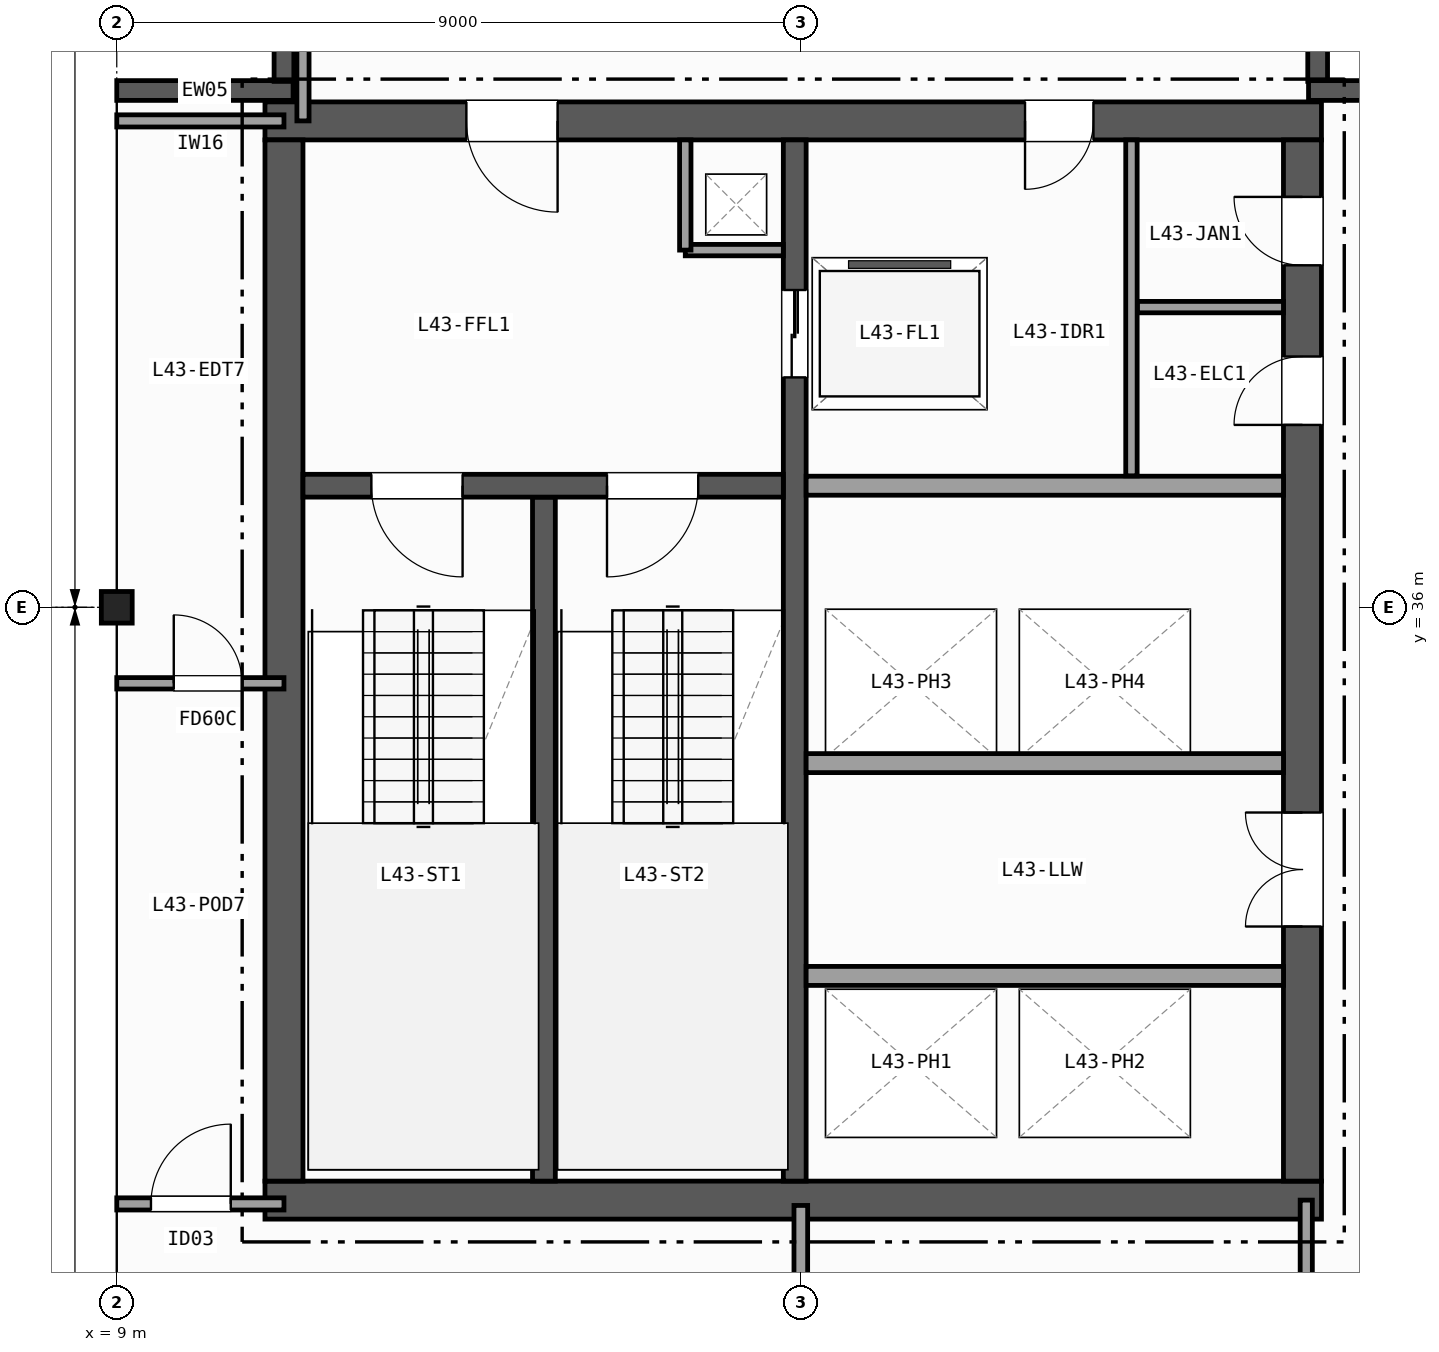
"""IFC4 building model, lengths in metres.
Left out: names, types, materials, properties, quantities, classifications, styles, units other than length and angle.
Written with IfcOpenShell. Run it as: python <this file> out.ifc"""

import sys

from ifc_helpers import new_model, si_unit, direction, frame, frame_2d, origin, origin_2d, place, context, subcontext, project, spatial, rectangle, i_section, extrude, element, fill, save


model = new_model("IFC4")
c1 = context("Model", 3, precision=1e-05, world=origin(), true_north=direction((0.0, 1.0)))
c2 = subcontext(c1, "Body", "Model", "MODEL_VIEW")
j1 = project(units=[si_unit("LENGTHUNIT", "METRE"), si_unit("PLANEANGLEUNIT", "RADIAN")], contexts=[c1])
p1 = place(None, origin())
s1 = spatial("IfcSite", under=j1, at=p1, CompositionType="ELEMENT")
p2 = place(p1, origin())
s2 = spatial("IfcBuilding", under=s1, at=p2, CompositionType="ELEMENT")
p3 = place(p2, frame((0.0, 0.0, 174.2)))
s3 = spatial("IfcBuildingStorey", under=s2, at=p3, CompositionType="ELEMENT", Elevation=174.2)
p4 = place(p3, frame((9.0, 36.0, 0.0), z_axis=(0.0, 0.0, 1.0), x_axis=(1.0, 0.0, 0.0)))
e1 = element("IfcColumn", 1, at=p4, inside=s3, PredefinedType="COLUMN", context=c2, shape_type="SweptSolid", body=[
    extrude(i_section(OverallWidth=0.406, OverallDepth=0.416, WebThickness=0.03, FlangeThickness=0.048, FilletRadius=0.015, at=origin_2d()), origin(), (0.0, 0.0, 1.0), 3.7),
])
p5 = place(p3, frame((9.0, 42.8, 0.0), z_axis=(0.0, 0.0, 1.0), x_axis=(1.0, 0.0, 0.0)))
e2 = element("IfcWall", 2, at=p5, inside=s3, PredefinedType="SOLIDWALL", context=c2, shape_type="SweptSolid", body=[
    extrude(rectangle(XDim=2.32, YDim=0.26, at=frame_2d((1.16, 0.0))), origin(), (0.0, 0.0, 1.0), 3.42),
])
for number, where, z_axis, x_axis in (
    (3, (11.2, 42.92, 0.0), (0.0, 0.0, 1.0), (0.0, 1.0, 0.0)),
    (4, (24.8, 45.0, 0.0), (0.0, 0.0, 1.0), (0.0, -1.0, 0.0)),
):
    element("IfcWall", number, at=place(p3, frame(where, z_axis=z_axis, x_axis=x_axis)), inside=s3, PredefinedType="SOLIDWALL", context=c2, shape_type="SweptSolid", body=[
        extrude(rectangle(XDim=2.08, YDim=0.26, at=frame_2d((1.04, 0.0))), origin(), (0.0, 0.0, 1.0), 3.42),
    ])
p6 = place(p3, frame((24.68, 42.8, 0.0), z_axis=(0.0, 0.0, 1.0), x_axis=(1.0, 0.0, 0.0)))
e5 = element("IfcWall", 5, at=p6, inside=s3, PredefinedType="SOLIDWALL", context=c2, shape_type="SweptSolid", body=[
    extrude(rectangle(XDim=2.32, YDim=0.26, at=frame_2d((1.16, 0.0))), origin(), (0.0, 0.0, 1.0), 3.42),
])
p7 = place(p3, frame((10.95, 28.2, 0.0), z_axis=(0.0, 0.0, 1.0), x_axis=(1.0, 0.0, 0.0)))
e6 = element("IfcWall", 6, at=p7, inside=s3, PredefinedType="SHEAR", context=c2, shape_type="SweptSolid", body=[
    extrude(rectangle(XDim=13.9, YDim=0.5, at=frame_2d((6.95, 0.0))), origin(), (0.0, 0.0, 1.0), 3.42),
])
p8 = place(p3, frame((24.85, 42.4, 0.0), z_axis=(0.0, 0.0, 1.0), x_axis=(-1.0, 0.0, 0.0)))
e7 = element("IfcWall", 7, at=p8, inside=s3, PredefinedType="SHEAR", context=c2, shape_type="SweptSolid", body=[
    extrude(rectangle(XDim=13.9, YDim=0.5, at=frame_2d((6.95, 0.0))), origin(), (0.0, 0.0, 1.0), 3.42),
])
p9 = place(p8, frame((10.05, 0.0, 0.0)))
e8 = element("IfcOpeningElement", 8, at=p9, cuts=e7, PredefinedType="OPENING", context=c2, shape_type="SweptSolid", body=[
    extrude(rectangle(XDim=1.2, YDim=2.15, at=frame_2d((0.6, 1.075))), frame((0.0, 0.26, 0.0), z_axis=(0.0, -1.0, 0.0), x_axis=(1.0, 0.0, 0.0)), (0.0, 0.0, 1.0), 0.52),
])
p10 = place(p8, frame((3.0, 0.0, 0.0)))
e9 = element("IfcOpeningElement", 9, at=p10, cuts=e7, PredefinedType="OPENING", context=c2, shape_type="SweptSolid", body=[
    extrude(rectangle(XDim=0.9, YDim=2.1, at=frame_2d((0.45, 1.05))), frame((0.0, 0.26, 0.0), z_axis=(0.0, -1.0, 0.0), x_axis=(1.0, 0.0, 0.0)), (0.0, 0.0, 1.0), 0.52),
])
p11 = place(p3, frame((11.2, 42.15, 0.0), z_axis=(0.0, 0.0, 1.0), x_axis=(0.0, -1.0, 0.0)))
e10 = element("IfcWall", 10, at=p11, inside=s3, PredefinedType="SHEAR", context=c2, shape_type="SweptSolid", body=[
    extrude(rectangle(XDim=13.7, YDim=0.5, at=frame_2d((6.85, 0.0))), origin(), (0.0, 0.0, 1.0), 3.42),
])
p12 = place(p3, frame((24.6, 28.45, 0.0), z_axis=(0.0, 0.0, 1.0), x_axis=(0.0, 1.0, 0.0)))
e11 = element("IfcWall", 11, at=p12, inside=s3, PredefinedType="SHEAR", context=c2, shape_type="SweptSolid", body=[
    extrude(rectangle(XDim=13.7, YDim=0.5, at=frame_2d((6.85, 0.0))), origin(), (0.0, 0.0, 1.0), 3.42),
])
p13 = place(p12, frame((3.35, 0.0, 0.0)))
e12 = element("IfcOpeningElement", 12, at=p13, cuts=e11, PredefinedType="OPENING", context=c2, shape_type="SweptSolid", body=[
    extrude(rectangle(XDim=1.5, YDim=2.2, at=frame_2d((0.75, 1.1))), frame((0.0, 0.26, 0.0), z_axis=(0.0, -1.0, 0.0), x_axis=(1.0, 0.0, 0.0)), (0.0, 0.0, 1.0), 0.52),
])
p14 = place(p12, frame((9.95, 0.0, 0.0)))
e13 = element("IfcOpeningElement", 13, at=p14, cuts=e11, PredefinedType="OPENING", context=c2, shape_type="SweptSolid", body=[
    extrude(rectangle(XDim=0.9, YDim=2.1, at=frame_2d((0.45, 1.05))), frame((0.0, 0.26, 0.0), z_axis=(0.0, -1.0, 0.0), x_axis=(1.0, 0.0, 0.0)), (0.0, 0.0, 1.0), 0.52),
])
p15 = place(p12, frame((12.05, 0.0, 0.0)))
e14 = element("IfcOpeningElement", 14, at=p15, cuts=e11, PredefinedType="OPENING", context=c2, shape_type="SweptSolid", body=[
    extrude(rectangle(XDim=0.9, YDim=2.1, at=frame_2d((0.45, 1.05))), frame((0.0, 0.26, 0.0), z_axis=(0.0, -1.0, 0.0), x_axis=(1.0, 0.0, 0.0)), (0.0, 0.0, 1.0), 0.52),
])
p16 = place(p3, frame((14.62, 28.45, 0.0), z_axis=(0.0, 0.0, 1.0), x_axis=(0.0, 1.0, 0.0)))
e15 = element("IfcWall", 15, at=p16, inside=s3, PredefinedType="SHEAR", context=c2, shape_type="SweptSolid", body=[
    extrude(rectangle(XDim=9.0, YDim=0.3, at=frame_2d((4.5, 0.0))), origin(), (0.0, 0.0, 1.0), 3.42),
])
p17 = place(p3, frame((17.92, 42.15, 0.0), z_axis=(0.0, 0.0, 1.0), x_axis=(0.0, -1.0, 0.0)))
e16 = element("IfcWall", 16, at=p17, inside=s3, PredefinedType="SHEAR", context=c2, shape_type="SweptSolid", body=[
    extrude(rectangle(XDim=13.7, YDim=0.3, at=frame_2d((6.85, 0.0))), origin(), (0.0, 0.0, 1.0), 3.42),
])
p18 = place(p17, frame((1.975, 0.0, 0.0)))
e17 = element("IfcOpeningElement", 17, at=p18, cuts=e16, PredefinedType="OPENING", context=c2, shape_type="SweptSolid", body=[
    extrude(rectangle(XDim=1.15, YDim=2.15, at=frame_2d((0.575, 1.075))), frame((0.0, 0.16, 0.0), z_axis=(0.0, -1.0, 0.0), x_axis=(1.0, 0.0, 0.0)), (0.0, 0.0, 1.0), 0.32),
])
p19 = place(p3, frame((17.77, 37.6, 0.0), z_axis=(0.0, 0.0, 1.0), x_axis=(-1.0, 0.0, 0.0)))
e18 = element("IfcWall", 18, at=p19, inside=s3, PredefinedType="SHEAR", context=c2, shape_type="SweptSolid", body=[
    extrude(rectangle(XDim=6.32, YDim=0.3, at=frame_2d((3.16, 0.0))), origin(), (0.0, 0.0, 1.0), 3.42),
])
p20 = place(p19, frame((4.22, 0.0, 0.0)))
e19 = element("IfcOpeningElement", 19, at=p20, cuts=e18, PredefinedType="OPENING", context=c2, shape_type="SweptSolid", body=[
    extrude(rectangle(XDim=1.2, YDim=2.15, at=frame_2d((0.6, 1.075))), frame((0.0, 0.16, 0.0), z_axis=(0.0, -1.0, 0.0), x_axis=(1.0, 0.0, 0.0)), (0.0, 0.0, 1.0), 0.32),
])
p21 = place(p19, frame((1.12, 0.0, 0.0)))
e20 = element("IfcOpeningElement", 20, at=p21, cuts=e18, PredefinedType="OPENING", context=c2, shape_type="SweptSolid", body=[
    extrude(rectangle(XDim=1.2, YDim=2.15, at=frame_2d((0.6, 1.075))), frame((0.0, 0.16, 0.0), z_axis=(0.0, -1.0, 0.0), x_axis=(1.0, 0.0, 0.0)), (0.0, 0.0, 1.0), 0.32),
])
p22 = place(p3, frame((16.48, 40.7, 0.0), z_axis=(0.0, 0.0, 1.0), x_axis=(1.0, 0.0, 0.0)))
e21 = element("IfcWall", 21, at=p22, inside=s3, PredefinedType="PARTITIONING", context=c2, shape_type="SweptSolid", body=[
    extrude(rectangle(XDim=1.29, YDim=0.15, at=frame_2d((0.645, 0.0))), origin(), (0.0, 0.0, 1.0), 3.42),
])
p23 = place(p3, frame((16.48, 40.7, 0.0), z_axis=(0.0, 0.0, 1.0), x_axis=(0.0, 1.0, 0.0)))
e22 = element("IfcWall", 22, at=p23, inside=s3, PredefinedType="PARTITIONING", context=c2, shape_type="SweptSolid", body=[
    extrude(rectangle(XDim=1.45, YDim=0.15, at=frame_2d((0.725, 0.0))), origin(), (0.0, 0.0, 1.0), 3.42),
])
for number, where, z_axis, x_axis in (
    (23, (18.07, 37.6, 0.0), (0.0, 0.0, 1.0), (1.0, 0.0, 0.0)),
    (24, (18.07, 31.15, 0.0), (0.0, 0.0, 1.0), (1.0, 0.0, 0.0)),
    (25, (24.35, 33.95, 0.0), (0.0, 0.0, 1.0), (-1.0, 0.0, 0.0)),
):
    element("IfcWall", number, at=place(p3, frame(where, z_axis=z_axis, x_axis=x_axis)), inside=s3, PredefinedType="PARTITIONING", context=c2, shape_type="SweptSolid", body=[
        extrude(rectangle(XDim=6.28, YDim=0.25, at=frame_2d((3.14, 0.0))), origin(), (0.0, 0.0, 1.0), 3.42),
    ])
p24 = place(p3, frame((22.35, 37.73, 0.0), z_axis=(0.0, 0.0, 1.0), x_axis=(0.0, 1.0, 0.0)))
e26 = element("IfcWall", 26, at=p24, inside=s3, PredefinedType="PARTITIONING", context=c2, shape_type="SweptSolid", body=[
    extrude(rectangle(XDim=4.42, YDim=0.15, at=frame_2d((2.21, 0.0))), origin(), (0.0, 0.0, 1.0), 3.42),
])
p25 = place(p3, frame((22.43, 39.95, 0.0), z_axis=(0.0, 0.0, 1.0), x_axis=(1.0, 0.0, 0.0)))
e27 = element("IfcWall", 27, at=p25, inside=s3, PredefinedType="PARTITIONING", context=c2, shape_type="SweptSolid", body=[
    extrude(rectangle(XDim=1.92, YDim=0.15, at=frame_2d((0.96, 0.0))), origin(), (0.0, 0.0, 1.0), 3.42),
])
p26 = place(p3, frame((9.0, 28.15, 0.0), z_axis=(0.0, 0.0, 1.0), x_axis=(1.0, 0.0, 0.0)))
e28 = element("IfcWall", 28, at=p26, inside=s3, PredefinedType="PARTITIONING", context=c2, shape_type="SweptSolid", body=[
    extrude(rectangle(XDim=2.2, YDim=0.16, at=frame_2d((1.1, 0.0))), origin(), (0.0, 0.0, 1.0), 2.634),
])
p27 = place(p26, frame((0.45, 0.0, 0.0)))
e29 = element("IfcOpeningElement", 29, at=p27, cuts=e28, PredefinedType="OPENING", context=c2, shape_type="SweptSolid", body=[
    extrude(rectangle(XDim=1.05, YDim=2.15, at=frame_2d((0.525, 1.075))), frame((0.0, 0.09, 0.0), z_axis=(0.0, -1.0, 0.0), x_axis=(1.0, 0.0, 0.0)), (0.0, 0.0, 1.0), 0.18),
])
p28 = place(p3, frame((9.0, 42.4, 0.0), z_axis=(0.0, 0.0, 1.0), x_axis=(1.0, 0.0, 0.0)))
e30 = element("IfcWall", 30, at=p28, inside=s3, PredefinedType="PARTITIONING", context=c2, shape_type="SweptSolid", body=[
    extrude(rectangle(XDim=2.2, YDim=0.16, at=frame_2d((1.1, 0.0))), origin(), (0.0, 0.0, 1.0), 3.42),
])
p29 = place(p3, frame((11.45, 42.4, 0.0), z_axis=(0.0, 0.0, 1.0), x_axis=(0.0, 1.0, 0.0)))
e31 = element("IfcWall", 31, at=p29, inside=s3, PredefinedType="PARTITIONING", context=c2, shape_type="SweptSolid", body=[
    extrude(rectangle(XDim=2.666, YDim=0.16, at=frame_2d((1.333, 0.0))), origin(), (0.0, 0.0, 1.0), 3.42),
])
p30 = place(p3, frame((9.0, 35.0, 0.0), z_axis=(0.0, 0.0, 1.0), x_axis=(1.0, 0.0, 0.0)))
e32 = element("IfcWall", 32, at=p30, inside=s3, PredefinedType="PARTITIONING", context=c2, shape_type="SweptSolid", body=[
    extrude(rectangle(XDim=2.2, YDim=0.15, at=frame_2d((1.1, 0.0))), origin(), (0.0, 0.0, 1.0), 2.634),
])
p31 = place(p30, frame((0.75, 0.0, 0.0)))
e33 = element("IfcOpeningElement", 33, at=p31, cuts=e32, PredefinedType="OPENING", context=c2, shape_type="SweptSolid", body=[
    extrude(rectangle(XDim=0.9, YDim=2.1, at=frame_2d((0.45, 1.05))), frame((0.0, 0.085, 0.0), z_axis=(0.0, -1.0, 0.0), x_axis=(1.0, 0.0, 0.0)), (0.0, 0.0, 1.0), 0.17),
])
p32 = place(p3, frame((24.65, 9.0, 0.0), z_axis=(0.0, 0.0, 1.0), x_axis=(0.0, 1.0, 0.0)))
e34 = element("IfcWall", 34, at=p32, inside=s3, PredefinedType="PARTITIONING", context=c2, shape_type="SweptSolid", body=[
    extrude(rectangle(XDim=19.2, YDim=0.16, at=frame_2d((9.6, 0.0))), origin(), (0.0, 0.0, 1.0), 2.634),
])
p33 = place(p32, frame((2.4, 0.0, 0.0)))
e35 = element("IfcOpeningElement", 35, at=p33, cuts=e34, PredefinedType="OPENING", context=c2, shape_type="SweptSolid", body=[
    extrude(rectangle(XDim=0.86, YDim=2.05, at=frame_2d((0.43, 1.025))), frame((0.0, 0.09, 0.0), z_axis=(0.0, -1.0, 0.0), x_axis=(1.0, 0.0, 0.0)), (0.0, 0.0, 1.0), 0.18),
])
p34 = place(p32, frame((8.55, 0.0, 0.0)))
e36 = element("IfcOpeningElement", 36, at=p34, cuts=e34, PredefinedType="OPENING", context=c2, shape_type="SweptSolid", body=[
    extrude(rectangle(XDim=0.95, YDim=2.1, at=frame_2d((0.475, 1.05))), frame((0.0, 0.09, 0.0), z_axis=(0.0, -1.0, 0.0), x_axis=(1.0, 0.0, 0.0)), (0.0, 0.0, 1.0), 0.18),
])
p35 = place(p32, frame((15.215, 0.0, 0.0)))
e37 = element("IfcOpeningElement", 37, at=p35, cuts=e34, PredefinedType="OPENING", context=c2, shape_type="SweptSolid", body=[
    extrude(rectangle(XDim=1.0, YDim=2.1, at=frame_2d((0.5, 1.05))), frame((0.0, 0.09, 0.0), z_axis=(0.0, -1.0, 0.0), x_axis=(1.0, 0.0, 0.0)), (0.0, 0.0, 1.0), 0.18),
])
p36 = place(p3, frame((18.0, 9.0, 0.0), z_axis=(0.0, 0.0, 1.0), x_axis=(0.0, 1.0, 0.0)))
e38 = element("IfcWall", 38, at=p36, inside=s3, PredefinedType="PARTITIONING", context=c2, shape_type="SweptSolid", body=[
    extrude(rectangle(XDim=19.13, YDim=0.18, at=frame_2d((9.565, 0.0))), origin(), (0.0, 0.0, 1.0), 2.634),
])
p37 = place(p36, frame((2.2, 0.0, 0.0)))
e39 = element("IfcOpeningElement", 39, at=p37, cuts=e38, PredefinedType="OPENING", context=c2, shape_type="SweptSolid", body=[
    extrude(rectangle(XDim=1.05, YDim=2.15, at=frame_2d((0.525, 1.075))), frame((0.0, 0.1, 0.0), z_axis=(0.0, -1.0, 0.0), x_axis=(1.0, 0.0, 0.0)), (0.0, 0.0, 1.0), 0.2),
])
p38 = place(p36, frame((13.5, 0.0, 0.0)))
e40 = element("IfcOpeningElement", 40, at=p38, cuts=e38, PredefinedType="OPENING", context=c2, shape_type="SweptSolid", body=[
    extrude(rectangle(XDim=1.2, YDim=2.15, at=frame_2d((0.6, 1.075))), frame((0.0, 0.1, 0.0), z_axis=(0.0, -1.0, 0.0), x_axis=(1.0, 0.0, 0.0)), (0.0, 0.0, 1.0), 0.2),
])
p39 = place(p20, origin())
e41 = element("IfcDoor", 41, at=p39, inside=s3, OperationType="SINGLE_SWING_LEFT", PredefinedType="DOOR", context=c2, shape_type="SweptSolid", body=[
    extrude(rectangle(XDim=1.2, YDim=2.15, at=frame_2d((0.6, 1.075))), frame((0.0, 0.025, 0.0), z_axis=(0.0, -1.0, 0.0), x_axis=(1.0, 0.0, 0.0)), (0.0, 0.0, 1.0), 0.05),
])
fill(e19, e41)
p40 = place(p21, origin())
e42 = element("IfcDoor", 42, at=p40, inside=s3, OperationType="SINGLE_SWING_RIGHT", PredefinedType="DOOR", context=c2, shape_type="SweptSolid", body=[
    extrude(rectangle(XDim=1.2, YDim=2.15, at=frame_2d((0.6, 1.075))), frame((0.0, 0.025, 0.0), z_axis=(0.0, -1.0, 0.0), x_axis=(1.0, 0.0, 0.0)), (0.0, 0.0, 1.0), 0.05),
])
fill(e20, e42)
p41 = place(p13, origin())
e43 = element("IfcDoor", 43, at=p41, inside=s3, OperationType="DOUBLE_DOOR_SINGLE_SWING", PredefinedType="DOOR", context=c2, shape_type="SweptSolid", body=[
    extrude(rectangle(XDim=1.5, YDim=2.2, at=frame_2d((0.75, 1.1))), frame((0.0, 0.025, 0.0), z_axis=(0.0, -1.0, 0.0), x_axis=(1.0, 0.0, 0.0)), (0.0, 0.0, 1.0), 0.05),
])
fill(e12, e43)
p42 = place(p9, origin())
e44 = element("IfcDoor", 44, at=p42, inside=s3, OperationType="SINGLE_SWING_LEFT", PredefinedType="DOOR", context=c2, shape_type="SweptSolid", body=[
    extrude(rectangle(XDim=1.2, YDim=2.15, at=frame_2d((0.6, 1.075))), frame((0.0, 0.025, 0.0), z_axis=(0.0, -1.0, 0.0), x_axis=(1.0, 0.0, 0.0)), (0.0, 0.0, 1.0), 0.05),
])
fill(e8, e44)
p43 = place(p14, origin())
e45 = element("IfcDoor", 45, at=p43, inside=s3, OperationType="SINGLE_SWING_LEFT", PredefinedType="DOOR", context=c2, shape_type="SweptSolid", body=[
    extrude(rectangle(XDim=0.9, YDim=2.1, at=frame_2d((0.45, 1.05))), frame((0.0, 0.025, 0.0), z_axis=(0.0, -1.0, 0.0), x_axis=(1.0, 0.0, 0.0)), (0.0, 0.0, 1.0), 0.05),
])
fill(e13, e45)
p44 = place(p10, origin())
e46 = element("IfcDoor", 46, at=p44, inside=s3, OperationType="SINGLE_SWING_RIGHT", PredefinedType="DOOR", context=c2, shape_type="SweptSolid", body=[
    extrude(rectangle(XDim=0.9, YDim=2.1, at=frame_2d((0.45, 1.05))), frame((0.0, 0.025, 0.0), z_axis=(0.0, -1.0, 0.0), x_axis=(1.0, 0.0, 0.0)), (0.0, 0.0, 1.0), 0.05),
])
fill(e9, e46)
p45 = place(p15, origin())
e47 = element("IfcDoor", 47, at=p45, inside=s3, OperationType="SINGLE_SWING_RIGHT", PredefinedType="DOOR", context=c2, shape_type="SweptSolid", body=[
    extrude(rectangle(XDim=0.9, YDim=2.1, at=frame_2d((0.45, 1.05))), frame((0.0, 0.025, 0.0), z_axis=(0.0, -1.0, 0.0), x_axis=(1.0, 0.0, 0.0)), (0.0, 0.0, 1.0), 0.05),
])
fill(e14, e47)
p46 = place(p18, origin())
e48 = element("IfcDoor", 48, at=p46, inside=s3, OperationType="DOUBLE_DOOR_SLIDING", PredefinedType="DOOR", context=c2, shape_type="SweptSolid", body=[
    extrude(rectangle(XDim=1.15, YDim=2.15, at=frame_2d((0.575, 1.075))), frame((0.0, 0.025, 0.0), z_axis=(0.0, -1.0, 0.0), x_axis=(1.0, 0.0, 0.0)), (0.0, 0.0, 1.0), 0.05),
])
fill(e17, e48)
p47 = place(p27, origin())
e49 = element("IfcDoor", 49, at=p47, inside=s3, OperationType="SINGLE_SWING_RIGHT", PredefinedType="DOOR", context=c2, shape_type="SweptSolid", body=[
    extrude(rectangle(XDim=1.05, YDim=2.15, at=frame_2d((0.525, 1.075))), frame((0.0, 0.025, 0.0), z_axis=(0.0, -1.0, 0.0), x_axis=(1.0, 0.0, 0.0)), (0.0, 0.0, 1.0), 0.05),
])
fill(e29, e49)
p48 = place(p31, origin())
e50 = element("IfcDoor", 50, at=p48, inside=s3, OperationType="SINGLE_SWING_LEFT", PredefinedType="DOOR", context=c2, shape_type="SweptSolid", body=[
    extrude(rectangle(XDim=0.9, YDim=2.1, at=frame_2d((0.45, 1.05))), frame((0.0, 0.025, 0.0), z_axis=(0.0, -1.0, 0.0), x_axis=(1.0, 0.0, 0.0)), (0.0, 0.0, 1.0), 0.05),
])
fill(e33, e50)
save(model, sys.argv[1])
